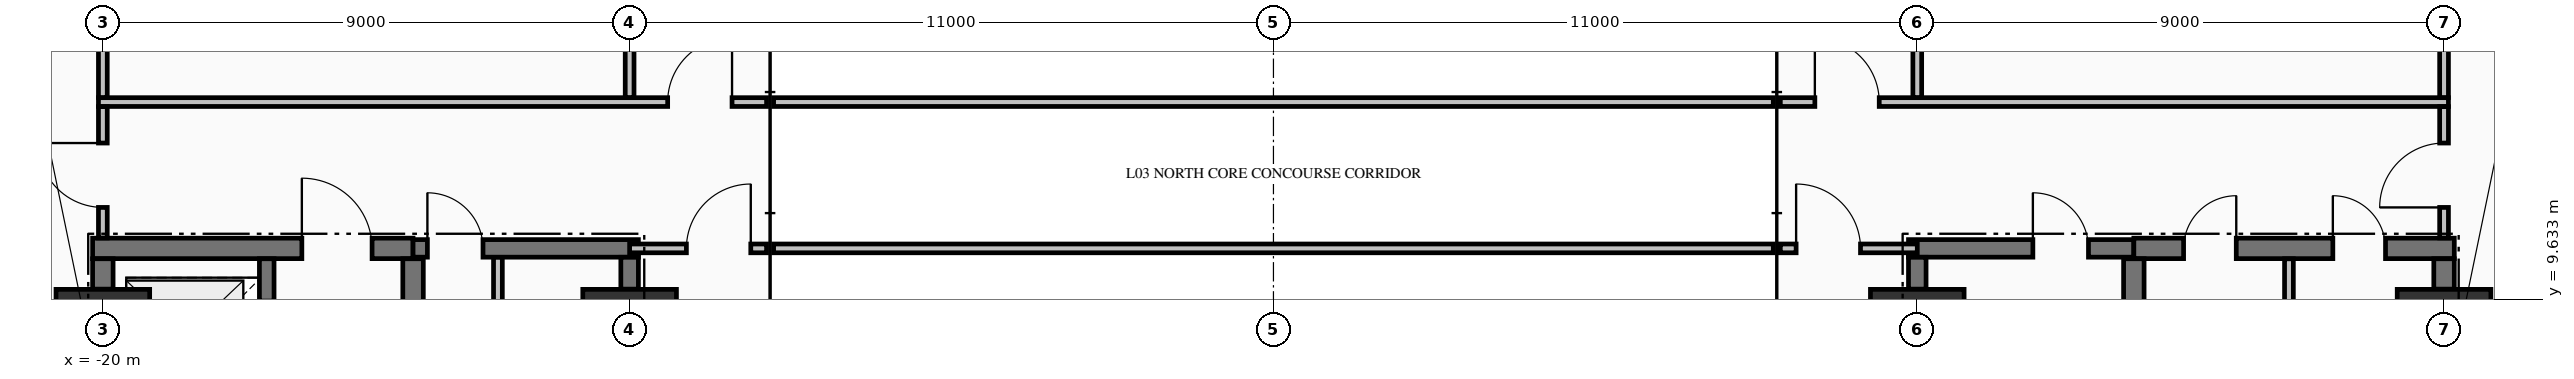
"""IFC4 building model, lengths in metres.
Left out: names, types, materials, properties, quantities, classifications, styles, units other than length and angle.
Written with IfcOpenShell. Run it as: python <this file> out.ifc"""

import sys

from ifc_helpers import new_model, si_unit, direction, frame, frame_2d, origin, origin_2d, place, context, subcontext, project, spatial, rectangle, extrude, element, fill, save


model = new_model("IFC4")
c1 = context("Model", 3, precision=1e-05, world=origin(), true_north=direction((0.0, 1.0)))
c2 = subcontext(c1, "Body", "Model", "MODEL_VIEW")
j1 = project(units=[si_unit("LENGTHUNIT", "METRE"), si_unit("PLANEANGLEUNIT", "RADIAN")], contexts=[c1])
p1 = place(None, origin())
s1 = spatial("IfcSite", under=j1, at=p1, CompositionType="ELEMENT")
p2 = place(p1, origin())
s2 = spatial("IfcBuilding", under=s1, at=p2, CompositionType="ELEMENT")
p3 = place(p2, frame((0.0, 0.0, 16.32)))
s3 = spatial("IfcBuildingStorey", under=s2, at=p3, CompositionType="ELEMENT", Elevation=16.32)
for number, where, z_axis, x_axis in (
    (1, (-20.0, 9.0, 0.0), (0.0, 0.0, 1.0), (1.0, 0.0, 0.0)),
    (2, (-11.0, 9.0, 0.0), (0.0, 0.0, 1.0), (1.0, 0.0, 0.0)),
    (3, (11.0, 9.0, 0.0), (0.0, 0.0, 1.0), (1.0, 0.0, 0.0)),
    (4, (20.0, 9.0, 0.0), (0.0, 0.0, 1.0), (1.0, 0.0, 0.0)),
):
    element("IfcColumn", number, at=place(p3, frame(where, z_axis=z_axis, x_axis=x_axis)), inside=s3, PredefinedType="COLUMN", context=c2, shape_type="SweptSolid", body=[
        extrude(rectangle(XDim=1.6, YDim=1.6, at=origin_2d()), origin(), (0.0, 0.0, 1.0), 4.99),
    ])
p4 = place(p3, frame((-20.175, 10.5, 0.0), z_axis=(0.0, 0.0, 1.0), x_axis=(1.0, 0.0, 0.0)))
e5 = element("IfcWall", 5, at=p4, inside=s3, PredefinedType="SHEAR", context=c2, shape_type="SweptSolid", body=[
    extrude(rectangle(XDim=5.475, YDim=0.35, at=frame_2d((2.738, 0.0))), origin(), (0.0, 0.0, 1.0), 4.99),
])
p5 = place(p4, frame((3.575, 0.0, 0.0)))
e6 = element("IfcOpeningElement", 6, at=p5, cuts=e5, PredefinedType="OPENING", context=c2, shape_type="SweptSolid", body=[
    extrude(rectangle(XDim=1.2, YDim=2.15, at=frame_2d((0.6, 1.075))), frame((0.0, 0.185, 0.0), z_axis=(0.0, -1.0, 0.0), x_axis=(1.0, 0.0, 0.0)), (0.0, 0.0, 1.0), 0.37),
])
p6 = place(p3, frame((-14.7, 10.5, 0.0), z_axis=(0.0, 0.0, 1.0), x_axis=(1.0, 0.0, 0.0)))
e7 = element("IfcWall", 7, at=p6, inside=s3, PredefinedType="SHEAR", context=c2, shape_type="SweptSolid", body=[
    extrude(rectangle(XDim=3.85, YDim=0.3, at=frame_2d((1.925, 0.0))), origin(), (0.0, 0.0, 1.0), 4.99),
])
p7 = place(p6, frame((0.245, 0.0, 0.0)))
e8 = element("IfcOpeningElement", 8, at=p7, cuts=e7, PredefinedType="OPENING", context=c2, shape_type="SweptSolid", body=[
    extrude(rectangle(XDim=0.95, YDim=2.15, at=frame_2d((0.475, 1.075))), frame((0.0, 0.16, 0.0), z_axis=(0.0, -1.0, 0.0), x_axis=(1.0, 0.0, 0.0)), (0.0, 0.0, 1.0), 0.32),
])
p8 = place(p3, frame((10.85, 10.5, 0.0), z_axis=(0.0, 0.0, 1.0), x_axis=(1.0, 0.0, 0.0)))
e9 = element("IfcWall", 9, at=p8, inside=s3, PredefinedType="SHEAR", context=c2, shape_type="SweptSolid", body=[
    extrude(rectangle(XDim=3.85, YDim=0.3, at=frame_2d((1.925, 0.0))), origin(), (0.0, 0.0, 1.0), 4.99),
])
p9 = place(p8, frame((2.125, 0.0, 0.0)))
e10 = element("IfcOpeningElement", 10, at=p9, cuts=e9, PredefinedType="OPENING", context=c2, shape_type="SweptSolid", body=[
    extrude(rectangle(XDim=0.95, YDim=2.15, at=frame_2d((0.475, 1.075))), frame((0.0, 0.16, 0.0), z_axis=(0.0, -1.0, 0.0), x_axis=(1.0, 0.0, 0.0)), (0.0, 0.0, 1.0), 0.32),
])
p10 = place(p3, frame((14.7, 10.5, 0.0), z_axis=(0.0, 0.0, 1.0), x_axis=(1.0, 0.0, 0.0)))
e11 = element("IfcWall", 11, at=p10, inside=s3, PredefinedType="SHEAR", context=c2, shape_type="SweptSolid", body=[
    extrude(rectangle(XDim=5.475, YDim=0.35, at=frame_2d((2.738, 0.0))), origin(), (0.0, 0.0, 1.0), 4.99),
])
p11 = place(p10, frame((0.85, 0.0, 0.0)))
e12 = element("IfcOpeningElement", 12, at=p11, cuts=e11, PredefinedType="OPENING", context=c2, shape_type="SweptSolid", body=[
    extrude(rectangle(XDim=0.9, YDim=2.15, at=frame_2d((0.45, 1.075))), frame((0.0, 0.185, 0.0), z_axis=(0.0, -1.0, 0.0), x_axis=(1.0, 0.0, 0.0)), (0.0, 0.0, 1.0), 0.37),
])
p12 = place(p10, frame((3.4, 0.0, 0.0)))
e13 = element("IfcOpeningElement", 13, at=p12, cuts=e11, PredefinedType="OPENING", context=c2, shape_type="SweptSolid", body=[
    extrude(rectangle(XDim=0.9, YDim=2.15, at=frame_2d((0.45, 1.075))), frame((0.0, 0.185, 0.0), z_axis=(0.0, -1.0, 0.0), x_axis=(1.0, 0.0, 0.0)), (0.0, 0.0, 1.0), 0.37),
])
p13 = place(p3, frame((-11.0, 10.5, 0.0), z_axis=(0.0, 0.0, 1.0), x_axis=(1.0, 0.0, 0.0)))
e14 = element("IfcWall", 14, at=p13, inside=s3, PredefinedType="PARTITIONING", context=c2, shape_type="SweptSolid", body=[
    extrude(rectangle(XDim=2.34, YDim=0.15, at=frame_2d((1.17, 0.0))), origin(), (0.0, 0.0, 1.0), 4.99),
])
p14 = place(p13, frame((0.97, 0.0, 0.0)))
e15 = element("IfcOpeningElement", 15, at=p14, cuts=e14, PredefinedType="OPENING", context=c2, shape_type="SweptSolid", body=[
    extrude(rectangle(XDim=1.1, YDim=2.15, at=frame_2d((0.55, 1.075))), frame((0.0, 0.085, 0.0), z_axis=(0.0, -1.0, 0.0), x_axis=(1.0, 0.0, 0.0)), (0.0, 0.0, 1.0), 0.17),
])
p15 = place(p3, frame((-8.54, 10.5, 0.0), z_axis=(0.0, 0.0, 1.0), x_axis=(1.0, 0.0, 0.0)))
e16 = element("IfcWall", 16, at=p15, inside=s3, PredefinedType="PARTITIONING", context=c2, shape_type="SweptSolid", body=[
    extrude(rectangle(XDim=17.08, YDim=0.15, at=frame_2d((8.54, 0.0))), origin(), (0.0, 0.0, 1.0), 4.99),
])
p16 = place(p3, frame((8.66, 10.5, 0.0), z_axis=(0.0, 0.0, 1.0), x_axis=(1.0, 0.0, 0.0)))
e17 = element("IfcWall", 17, at=p16, inside=s3, PredefinedType="PARTITIONING", context=c2, shape_type="SweptSolid", body=[
    extrude(rectangle(XDim=2.34, YDim=0.15, at=frame_2d((1.17, 0.0))), origin(), (0.0, 0.0, 1.0), 4.99),
])
p17 = place(p16, frame((0.27, 0.0, 0.0)))
e18 = element("IfcOpeningElement", 18, at=p17, cuts=e17, PredefinedType="OPENING", context=c2, shape_type="SweptSolid", body=[
    extrude(rectangle(XDim=1.1, YDim=2.15, at=frame_2d((0.55, 1.075))), frame((0.0, 0.085, 0.0), z_axis=(0.0, -1.0, 0.0), x_axis=(1.0, 0.0, 0.0)), (0.0, 0.0, 1.0), 0.17),
])
p18 = place(p3, frame((-20.075, 13.0, 0.0), z_axis=(0.0, 0.0, 1.0), x_axis=(1.0, 0.0, 0.0)))
e19 = element("IfcWall", 19, at=p18, inside=s3, PredefinedType="PARTITIONING", context=c2, shape_type="SweptSolid", body=[
    extrude(rectangle(XDim=11.415, YDim=0.15, at=frame_2d((5.708, 0.0))), origin(), (0.0, 0.0, 1.0), 4.99),
])
p19 = place(p18, frame((9.725, 0.0, 0.0)))
e20 = element("IfcOpeningElement", 20, at=p19, cuts=e19, PredefinedType="OPENING", context=c2, shape_type="SweptSolid", body=[
    extrude(rectangle(XDim=1.1, YDim=2.15, at=frame_2d((0.55, 1.075))), frame((0.0, 0.085, 0.0), z_axis=(0.0, -1.0, 0.0), x_axis=(1.0, 0.0, 0.0)), (0.0, 0.0, 1.0), 0.17),
])
p20 = place(p3, frame((-8.54, 13.0, 0.0), z_axis=(0.0, 0.0, 1.0), x_axis=(1.0, 0.0, 0.0)))
e21 = element("IfcWall", 21, at=p20, inside=s3, PredefinedType="PARTITIONING", context=c2, shape_type="SweptSolid", body=[
    extrude(rectangle(XDim=17.08, YDim=0.15, at=frame_2d((8.54, 0.0))), origin(), (0.0, 0.0, 1.0), 4.99),
])
p21 = place(p3, frame((8.66, 13.0, 0.0), z_axis=(0.0, 0.0, 1.0), x_axis=(1.0, 0.0, 0.0)))
e22 = element("IfcWall", 22, at=p21, inside=s3, PredefinedType="PARTITIONING", context=c2, shape_type="SweptSolid", body=[
    extrude(rectangle(XDim=11.415, YDim=0.15, at=frame_2d((5.708, 0.0))), origin(), (0.0, 0.0, 1.0), 4.99),
])
p22 = place(p21, frame((0.59, 0.0, 0.0)))
e23 = element("IfcOpeningElement", 23, at=p22, cuts=e22, PredefinedType="OPENING", context=c2, shape_type="SweptSolid", body=[
    extrude(rectangle(XDim=1.1, YDim=2.15, at=frame_2d((0.55, 1.075))), frame((0.0, 0.085, 0.0), z_axis=(0.0, -1.0, 0.0), x_axis=(1.0, 0.0, 0.0)), (0.0, 0.0, 1.0), 0.17),
])
p23 = place(p3, frame((-20.0, 9.804, 0.0), z_axis=(0.0, 0.0, 1.0), x_axis=(0.0, 1.0, 0.0)))
e24 = element("IfcWall", 24, at=p23, inside=s3, PredefinedType="SHEAR", context=c2, shape_type="SweptSolid", body=[
    extrude(rectangle(XDim=0.519, YDim=0.35, at=frame_2d((0.26, 0.0))), origin(), (0.0, 0.0, 1.0), 4.99),
])
p24 = place(p3, frame((-17.2, 7.727, 0.0), z_axis=(0.0, 0.0, 1.0), x_axis=(0.0, 1.0, 0.0)))
e25 = element("IfcWall", 25, at=p24, inside=s3, PredefinedType="SOLIDWALL", context=c2, shape_type="SweptSolid", body=[
    extrude(rectangle(XDim=2.596, YDim=0.25, at=frame_2d((1.298, 0.0))), origin(), (0.0, 0.0, 1.0), 4.99),
])
p25 = place(p24, frame((0.773, 0.0, 0.0)))
e26 = element("IfcOpeningElement", 26, at=p25, cuts=e25, PredefinedType="OPENING", context=c2, shape_type="SweptSolid", body=[
    extrude(rectangle(XDim=1.1, YDim=2.2, at=frame_2d((0.55, 1.1))), frame((0.0, 0.135, 0.0), z_axis=(0.0, -1.0, 0.0), x_axis=(1.0, 0.0, 0.0)), (0.0, 0.0, 1.0), 0.27),
])
p26 = place(p3, frame((-14.7, 5.852, 0.0), z_axis=(0.0, 0.0, 1.0), x_axis=(0.0, 1.0, 0.0)))
e27 = element("IfcWall", 27, at=p26, inside=s3, PredefinedType="SHEAR", context=c2, shape_type="SweptSolid", body=[
    extrude(rectangle(XDim=4.471, YDim=0.35, at=frame_2d((2.235, 0.0))), origin(), (0.0, 0.0, 1.0), 4.99),
])
for number, where, z_axis, x_axis in (
    (28, (-11.0, 9.804, 0.0), (0.0, 0.0, 1.0), (0.0, 1.0, 0.0)),
    (29, (11.0, 9.804, 0.0), (0.0, 0.0, 1.0), (0.0, 1.0, 0.0)),
):
    element("IfcWall", number, at=place(p3, frame(where, z_axis=z_axis, x_axis=x_axis)), inside=s3, PredefinedType="SHEAR", context=c2, shape_type="SweptSolid", body=[
        extrude(rectangle(XDim=0.544, YDim=0.3, at=frame_2d((0.272, 0.0))), origin(), (0.0, 0.0, 1.0), 4.99),
    ])
p27 = place(p3, frame((14.7, 5.852, 0.0), z_axis=(0.0, 0.0, 1.0), x_axis=(0.0, 1.0, 0.0)))
e30 = element("IfcWall", 30, at=p27, inside=s3, PredefinedType="SHEAR", context=c2, shape_type="SweptSolid", body=[
    extrude(rectangle(XDim=4.471, YDim=0.35, at=frame_2d((2.235, 0.0))), origin(), (0.0, 0.0, 1.0), 4.99),
])
p28 = place(p3, frame((20.0, 9.804, 0.0), z_axis=(0.0, 0.0, 1.0), x_axis=(0.0, 1.0, 0.0)))
e31 = element("IfcWall", 31, at=p28, inside=s3, PredefinedType="SHEAR", context=c2, shape_type="SweptSolid", body=[
    extrude(rectangle(XDim=0.519, YDim=0.35, at=frame_2d((0.26, 0.0))), origin(), (0.0, 0.0, 1.0), 4.99),
])
p29 = place(p3, frame((-20.0, 10.678, 0.0), z_axis=(0.0, 0.0, 1.0), x_axis=(0.0, 1.0, 0.0)))
e32 = element("IfcWall", 32, at=p29, inside=s3, PredefinedType="PARTITIONING", context=c2, shape_type="SweptSolid", body=[
    extrude(rectangle(XDim=2.244, YDim=0.15, at=frame_2d((1.122, 0.0))), origin(), (0.0, 0.0, 1.0), 4.032),
])
p30 = place(p29, frame((0.522, 0.0, 0.0)))
e33 = element("IfcOpeningElement", 33, at=p30, cuts=e32, PredefinedType="OPENING", context=c2, shape_type="SweptSolid", body=[
    extrude(rectangle(XDim=1.1, YDim=2.15, at=frame_2d((0.55, 1.075))), frame((0.0, 0.085, 0.0), z_axis=(0.0, -1.0, 0.0), x_axis=(1.0, 0.0, 0.0)), (0.0, 0.0, 1.0), 0.17),
])
p31 = place(p3, frame((-20.0, 13.078, 0.0), z_axis=(0.0, 0.0, 1.0), x_axis=(0.0, 1.0, 0.0)))
e34 = element("IfcWall", 34, at=p31, inside=s3, PredefinedType="PARTITIONING", context=c2, shape_type="SweptSolid", body=[
    extrude(rectangle(XDim=2.116, YDim=0.15, at=frame_2d((1.058, 0.0))), origin(), (0.0, 0.0, 1.0), 4.032),
])
p32 = place(p3, frame((-13.25, 5.853, 0.0), z_axis=(0.0, 0.0, 1.0), x_axis=(0.0, 1.0, 0.0)))
e35 = element("IfcWall", 35, at=p32, inside=s3, PredefinedType="PARTITIONING", context=c2, shape_type="SweptSolid", body=[
    extrude(rectangle(XDim=4.494, YDim=0.15, at=frame_2d((2.247, 0.0))), origin(), (0.0, 0.0, 1.0), 4.99),
])
p33 = place(p32, frame((1.472, 0.0, 0.0)))
e36 = element("IfcOpeningElement", 36, at=p33, cuts=e35, PredefinedType="OPENING", context=c2, shape_type="SweptSolid", body=[
    extrude(rectangle(XDim=0.95, YDim=2.15, at=frame_2d((0.475, 1.075))), frame((0.0, 0.085, 0.0), z_axis=(0.0, -1.0, 0.0), x_axis=(1.0, 0.0, 0.0)), (0.0, 0.0, 1.0), 0.17),
])
for number, where, z_axis, x_axis in (
    (37, (-11.0, 13.078, 0.0), (0.0, 0.0, 1.0), (0.0, 1.0, 0.0)),
    (38, (11.0, 13.078, 0.0), (0.0, 0.0, 1.0), (0.0, 1.0, 0.0)),
):
    element("IfcWall", number, at=place(p3, frame(where, z_axis=z_axis, x_axis=x_axis)), inside=s3, PredefinedType="PARTITIONING", context=c2, shape_type="SweptSolid", body=[
        extrude(rectangle(XDim=2.116, YDim=0.15, at=frame_2d((1.058, 0.0))), origin(), (0.0, 0.0, 1.0), 3.332),
    ])
p34 = place(p3, frame((17.35, -4.422, 0.0), z_axis=(0.0, 0.0, 1.0), x_axis=(0.0, 1.0, 0.0)))
e39 = element("IfcWall", 39, at=p34, inside=s3, PredefinedType="PARTITIONING", context=c2, shape_type="SweptSolid", body=[
    extrude(rectangle(XDim=14.744, YDim=0.15, at=frame_2d((7.372, 0.0))), origin(), (0.0, 0.0, 1.0), 4.99),
])
p35 = place(p3, frame((20.0, 10.678, 0.0), z_axis=(0.0, 0.0, 1.0), x_axis=(0.0, 1.0, 0.0)))
e40 = element("IfcWall", 40, at=p35, inside=s3, PredefinedType="PARTITIONING", context=c2, shape_type="SweptSolid", body=[
    extrude(rectangle(XDim=2.244, YDim=0.15, at=frame_2d((1.122, 0.0))), origin(), (0.0, 0.0, 1.0), 3.332),
])
p36 = place(p35, frame((0.522, 0.0, 0.0)))
e41 = element("IfcOpeningElement", 41, at=p36, cuts=e40, PredefinedType="OPENING", context=c2, shape_type="SweptSolid", body=[
    extrude(rectangle(XDim=1.1, YDim=2.15, at=frame_2d((0.55, 1.075))), frame((0.0, 0.085, 0.0), z_axis=(0.0, -1.0, 0.0), x_axis=(1.0, 0.0, 0.0)), (0.0, 0.0, 1.0), 0.17),
])
p37 = place(p3, frame((20.0, 13.078, 0.0), z_axis=(0.0, 0.0, 1.0), x_axis=(0.0, 1.0, 0.0)))
e42 = element("IfcWall", 42, at=p37, inside=s3, PredefinedType="PARTITIONING", context=c2, shape_type="SweptSolid", body=[
    extrude(rectangle(XDim=2.116, YDim=0.15, at=frame_2d((1.058, 0.0))), origin(), (0.0, 0.0, 1.0), 3.332),
])
p38 = place(p7, origin())
e43 = element("IfcDoor", 43, at=p38, inside=s3, OperationType="SINGLE_SWING_LEFT", PredefinedType="DOOR", context=c2, shape_type="SweptSolid", body=[
    extrude(rectangle(XDim=0.95, YDim=2.15, at=frame_2d((0.475, 1.075))), frame((0.0, 0.025, 0.0), z_axis=(0.0, -1.0, 0.0), x_axis=(1.0, 0.0, 0.0)), (0.0, 0.0, 1.0), 0.05),
])
fill(e8, e43)
p39 = place(p9, origin())
e44 = element("IfcDoor", 44, at=p39, inside=s3, OperationType="SINGLE_SWING_LEFT", PredefinedType="DOOR", context=c2, shape_type="SweptSolid", body=[
    extrude(rectangle(XDim=0.95, YDim=2.15, at=frame_2d((0.475, 1.075))), frame((0.0, 0.025, 0.0), z_axis=(0.0, -1.0, 0.0), x_axis=(1.0, 0.0, 0.0)), (0.0, 0.0, 1.0), 0.05),
])
fill(e10, e44)
p40 = place(p5, origin())
e45 = element("IfcDoor", 45, at=p40, inside=s3, OperationType="SINGLE_SWING_LEFT", PredefinedType="DOOR", context=c2, shape_type="SweptSolid", body=[
    extrude(rectangle(XDim=1.2, YDim=2.15, at=frame_2d((0.6, 1.075))), frame((0.0, 0.025, 0.0), z_axis=(0.0, -1.0, 0.0), x_axis=(1.0, 0.0, 0.0)), (0.0, 0.0, 1.0), 0.05),
])
fill(e6, e45)
p41 = place(p11, origin())
e46 = element("IfcDoor", 46, at=p41, inside=s3, OperationType="SINGLE_SWING_RIGHT", PredefinedType="DOOR", context=c2, shape_type="SweptSolid", body=[
    extrude(rectangle(XDim=0.9, YDim=2.15, at=frame_2d((0.45, 1.075))), frame((0.0, 0.025, 0.0), z_axis=(0.0, -1.0, 0.0), x_axis=(1.0, 0.0, 0.0)), (0.0, 0.0, 1.0), 0.05),
])
fill(e12, e46)
p42 = place(p12, origin())
e47 = element("IfcDoor", 47, at=p42, inside=s3, OperationType="SINGLE_SWING_LEFT", PredefinedType="DOOR", context=c2, shape_type="SweptSolid", body=[
    extrude(rectangle(XDim=0.9, YDim=2.15, at=frame_2d((0.45, 1.075))), frame((0.0, 0.025, 0.0), z_axis=(0.0, -1.0, 0.0), x_axis=(1.0, 0.0, 0.0)), (0.0, 0.0, 1.0), 0.05),
])
fill(e13, e47)
p43 = place(p19, origin())
e48 = element("IfcDoor", 48, at=p43, inside=s3, OperationType="SINGLE_SWING_RIGHT", PredefinedType="DOOR", context=c2, shape_type="SweptSolid", body=[
    extrude(rectangle(XDim=1.1, YDim=2.15, at=frame_2d((0.55, 1.075))), frame((0.0, 0.025, 0.0), z_axis=(0.0, -1.0, 0.0), x_axis=(1.0, 0.0, 0.0)), (0.0, 0.0, 1.0), 0.05),
])
fill(e20, e48)
p44 = place(p22, origin())
e49 = element("IfcDoor", 49, at=p44, inside=s3, OperationType="SINGLE_SWING_LEFT", PredefinedType="DOOR", context=c2, shape_type="SweptSolid", body=[
    extrude(rectangle(XDim=1.1, YDim=2.15, at=frame_2d((0.55, 1.075))), frame((0.0, 0.025, 0.0), z_axis=(0.0, -1.0, 0.0), x_axis=(1.0, 0.0, 0.0)), (0.0, 0.0, 1.0), 0.05),
])
fill(e23, e49)
p45 = place(p14, origin())
e50 = element("IfcDoor", 50, at=p45, inside=s3, OperationType="SINGLE_SWING_RIGHT", PredefinedType="DOOR", context=c2, shape_type="SweptSolid", body=[
    extrude(rectangle(XDim=1.1, YDim=2.15, at=frame_2d((0.55, 1.075))), frame((0.0, 0.025, 0.0), z_axis=(0.0, -1.0, 0.0), x_axis=(1.0, 0.0, 0.0)), (0.0, 0.0, 1.0), 0.05),
])
fill(e15, e50)
p46 = place(p17, origin())
e51 = element("IfcDoor", 51, at=p46, inside=s3, OperationType="SINGLE_SWING_LEFT", PredefinedType="DOOR", context=c2, shape_type="SweptSolid", body=[
    extrude(rectangle(XDim=1.1, YDim=2.15, at=frame_2d((0.55, 1.075))), frame((0.0, 0.025, 0.0), z_axis=(0.0, -1.0, 0.0), x_axis=(1.0, 0.0, 0.0)), (0.0, 0.0, 1.0), 0.05),
])
fill(e18, e51)
p47 = place(p30, origin())
e52 = element("IfcDoor", 52, at=p47, inside=s3, OperationType="SINGLE_SWING_RIGHT", PredefinedType="DOOR", context=c2, shape_type="SweptSolid", body=[
    extrude(rectangle(XDim=1.1, YDim=2.15, at=frame_2d((0.55, 1.075))), frame((0.0, 0.025, 0.0), z_axis=(0.0, -1.0, 0.0), x_axis=(1.0, 0.0, 0.0)), (0.0, 0.0, 1.0), 0.05),
])
fill(e33, e52)
p48 = place(p36, origin())
e53 = element("IfcDoor", 53, at=p48, inside=s3, OperationType="SINGLE_SWING_LEFT", PredefinedType="DOOR", context=c2, shape_type="SweptSolid", body=[
    extrude(rectangle(XDim=1.1, YDim=2.15, at=frame_2d((0.55, 1.075))), frame((0.0, 0.025, 0.0), z_axis=(0.0, -1.0, 0.0), x_axis=(1.0, 0.0, 0.0)), (0.0, 0.0, 1.0), 0.05),
])
fill(e41, e53)
save(model, sys.argv[1])
